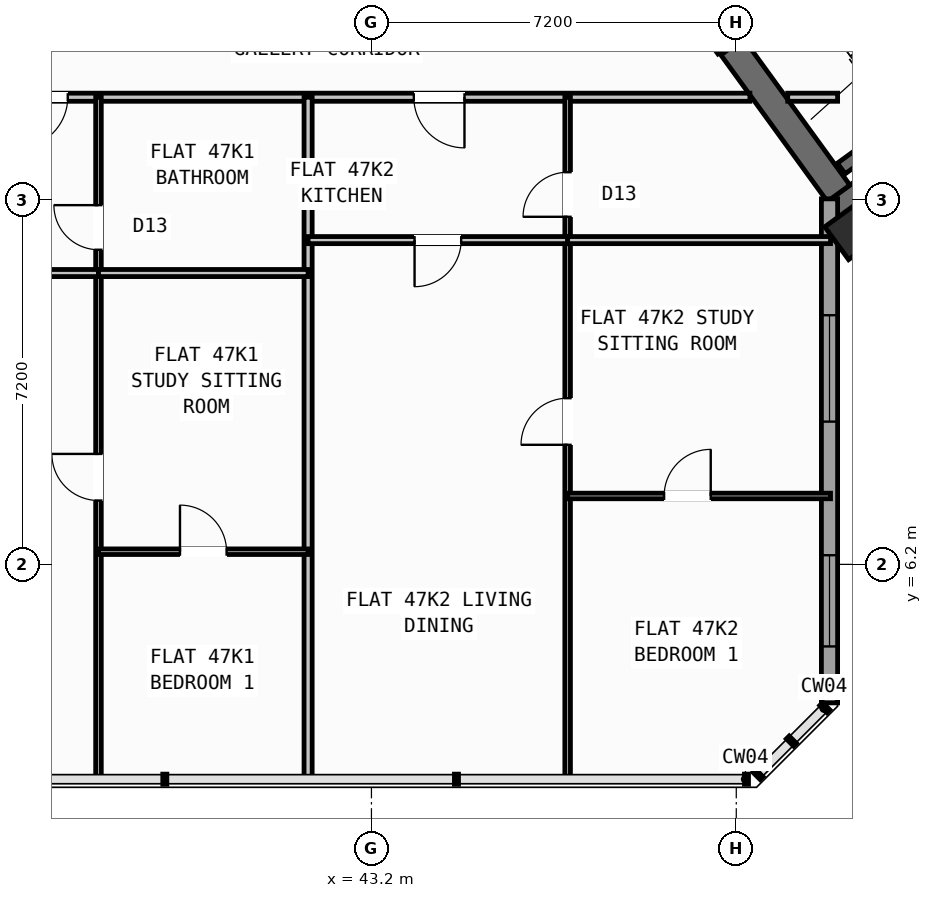
"""IFC4 building model, lengths in metres.
Left out: names, types, materials, properties, quantities, classifications, styles, units other than length and angle.
Written with IfcOpenShell. Run it as: python <this file> out.ifc"""

import sys

from ifc_helpers import new_model, si_unit, direction, frame, frame_2d, origin, origin_2d, place, context, subcontext, project, spatial, rectangle, hollow_rectangle, extrude, source, transform, mapped, element, fill, save


model = new_model("IFC4")
c1 = context("Model", 3, precision=1e-05, world=origin(), true_north=direction((0.0, 1.0)))
c2 = subcontext(c1, "Body", "Model", "MODEL_VIEW")
j1 = project(units=[si_unit("LENGTHUNIT", "METRE"), si_unit("PLANEANGLEUNIT", "RADIAN")], contexts=[c1])
p1 = place(None, origin())
s1 = spatial("IfcSite", under=j1, at=p1, CompositionType="ELEMENT")
p2 = place(p1, origin())
s2 = spatial("IfcBuilding", under=s1, at=p2, CompositionType="ELEMENT")
p3 = place(p2, frame((0.0, 0.0, 187.8)))
s3 = spatial("IfcBuildingStorey", under=s2, at=p3, CompositionType="ELEMENT", Elevation=187.8)
p4 = place(p3, frame((36.683, 18.304, 0.0), z_axis=(0.0, 0.0, 1.0), x_axis=(-0.529896466841, -0.848062341122, 0.0)))
e1 = element("IfcWall", 1, at=p4, inside=s3, PredefinedType="SHEAR", context=c2, shape_type="SweptSolid", body=[
    extrude(rectangle(XDim=6.425, YDim=0.55, at=frame_2d((3.212, 0.0))), origin(), (0.0, 0.0, 1.0), 3.35),
])
p5 = place(p3, frame((52.359, 13.14, 0.0), z_axis=(0.0, 0.0, 1.0), x_axis=(0.809014896919, 0.587788139183, 0.0)))
e2 = element("IfcWall", 2, at=p5, inside=s3, PredefinedType="SHEAR", context=c2, shape_type="SweptSolid", body=[
    extrude(rectangle(XDim=12.34, YDim=0.55, at=frame_2d((6.17, 0.0))), origin(), (0.0, 0.0, 1.0), 3.35),
])
p6 = place(p3, frame((52.42, 13.524, 0.0), z_axis=(0.0, 0.0, 1.0), x_axis=(-0.587802113096, 0.809004744015, 0.0)))
e3 = element("IfcWall", 3, at=p6, inside=s3, PredefinedType="SHEAR", context=c2, shape_type="SweptSolid", body=[
    extrude(rectangle(XDim=3.575, YDim=0.55, at=frame_2d((1.788, 0.0))), origin(), (0.0, 0.0, 1.0), 3.35),
])
m1 = source(origin(), c2, "Body", "SweptSolid", [
    extrude(hollow_rectangle(XDim=0.8, YDim=0.8, WallThickness=0.032, at=origin_2d()), origin(), (0.0, 0.0, 1.0), 3.6),
])
p7 = place(p3, frame((52.705, 12.773, 0.0), z_axis=(0.0, 0.0, 1.0), x_axis=(0.809016994375, 0.587785252292, 0.0)))
e4 = element("IfcColumn", 4, at=p7, inside=s3, PredefinedType="COLUMN", context=c2, shape_type="MappedRepresentation", body=[
    mapped(m1, transform((0.0, 0.0, 0.0), scale=1.0)),
])
p8 = place(p3, frame((52.24, 13.414, 0.0), z_axis=(0.0, 0.0, 1.0), x_axis=(0.0, -1.0, 0.0)))
e5 = element("IfcWall", 5, at=p8, inside=s3, PredefinedType="STANDARD", context=c2, shape_type="SweptSolid", body=[
    extrude(rectangle(XDim=9.948, YDim=0.32, at=frame_2d((4.974, 0.0))), origin(), (0.0, 0.0, 1.0), 3.35),
])
p9 = place(p8, frame((2.296, 0.0, 0.8)))
e6 = element("IfcOpeningElement", 6, at=p9, cuts=e5, PredefinedType="OPENING", context=c2, shape_type="SweptSolid", body=[
    extrude(rectangle(XDim=2.1, YDim=1.55, at=frame_2d((1.05, 0.775))), frame((0.0, 0.17, 0.0), z_axis=(0.0, -1.0, 0.0), x_axis=(1.0, 0.0, 0.0)), (0.0, 0.0, 1.0), 0.34),
])
p10 = place(p8, frame((7.033, 0.0, 0.85)))
e7 = element("IfcOpeningElement", 7, at=p10, cuts=e5, PredefinedType="OPENING", context=c2, shape_type="SweptSolid", body=[
    extrude(rectangle(XDim=1.8, YDim=1.5, at=frame_2d((0.9, 0.75))), frame((0.0, 0.17, 0.0), z_axis=(0.0, -1.0, 0.0), x_axis=(1.0, 0.0, 0.0)), (0.0, 0.0, 1.0), 0.34),
])
p11 = place(p3, frame((52.472, 14.013, 0.0), z_axis=(0.0, 0.0, 1.0), x_axis=(0.809028366311, 0.587769599847, 0.0)))
e8 = element("IfcWall", 8, at=p11, inside=s3, PredefinedType="SHEAR", context=c2, shape_type="SweptSolid", body=[
    extrude(rectangle(XDim=7.33, YDim=0.26, at=frame_2d((3.665, 0.0))), origin(), (0.0, 0.0, 1.0), 3.35),
])
p12 = place(p3, frame((35.237, 15.42, 0.0), z_axis=(0.0, 0.0, 1.0), x_axis=(1.0, 0.0, 0.0)))
e9 = element("IfcWall", 9, at=p12, inside=s3, PredefinedType="PARTITIONING", context=c2, shape_type="SweptSolid", body=[
    extrude(rectangle(XDim=15.432, YDim=0.16, at=frame_2d((7.716, 0.0))), origin(), (0.0, 0.0, 1.0), 3.34),
])
p13 = place(p12, frame((0.969, 0.0, 0.0)))
e10 = element("IfcOpeningElement", 10, at=p13, cuts=e9, PredefinedType="OPENING", context=c2, shape_type="SweptSolid", body=[
    extrude(rectangle(XDim=1.0, YDim=2.1, at=frame_2d((0.5, 1.05))), frame((0.0, 0.09, 0.0), z_axis=(0.0, -1.0, 0.0), x_axis=(1.0, 0.0, 0.0)), (0.0, 0.0, 1.0), 0.18),
])
p14 = place(p12, frame((8.799, 0.0, 0.0)))
e11 = element("IfcOpeningElement", 11, at=p14, cuts=e9, PredefinedType="OPENING", context=c2, shape_type="SweptSolid", body=[
    extrude(rectangle(XDim=1.0, YDim=2.1, at=frame_2d((0.5, 1.05))), frame((0.0, 0.09, 0.0), z_axis=(0.0, -1.0, 0.0), x_axis=(1.0, 0.0, 0.0)), (0.0, 0.0, 1.0), 0.18),
])
p15 = place(p3, frame((51.416, 15.42, 0.0), z_axis=(0.0, 0.0, 1.0), x_axis=(1.0, 0.0, 0.0)))
e12 = element("IfcWall", 12, at=p15, inside=s3, PredefinedType="PARTITIONING", context=c2, shape_type="SweptSolid", body=[
    extrude(rectangle(XDim=0.984, YDim=0.16, at=frame_2d((0.492, 0.0))), origin(), (0.0, 0.0, 1.0), 3.34),
])
p16 = place(p3, frame((50.119, 16.333, 0.0), z_axis=(0.0, 0.0, 1.0), x_axis=(-0.587749856981, 0.809042709391, 0.0)))
e13 = element("IfcWall", 13, at=p16, inside=s3, PredefinedType="STANDARD", context=c2, shape_type="SweptSolid", body=[
    extrude(rectangle(XDim=2.96, YDim=0.2, at=frame_2d((1.48, 0.0))), origin(), (0.0, 0.0, 1.0), 3.34),
])
p17 = place(p16, frame((0.53, 0.0, 0.0)))
e14 = element("IfcOpeningElement", 14, at=p17, cuts=e13, PredefinedType="OPENING", context=c2, shape_type="SweptSolid", body=[
    extrude(rectangle(XDim=1.5, YDim=2.15, at=frame_2d((0.75, 1.075))), frame((0.0, 0.11, 0.0), z_axis=(0.0, -1.0, 0.0), x_axis=(1.0, 0.0, 0.0)), (0.0, 0.0, 1.0), 0.22),
])
p18 = place(p3, frame((41.95, 1.96, 0.0), z_axis=(0.0, 0.0, 1.0), x_axis=(0.0, 1.0, 0.0)))
e15 = element("IfcWall", 15, at=p18, inside=s3, PredefinedType="PARTITIONING", context=c2, shape_type="SweptSolid", body=[
    extrude(rectangle(XDim=13.46, YDim=0.16, at=frame_2d((6.73, 0.0))), origin(), (0.0, 0.0, 1.0), 3.34),
])
p19 = place(p3, frame((37.813, 1.96, 0.0), z_axis=(0.0, 0.0, 1.0), x_axis=(0.0, 1.0, 0.0)))
e16 = element("IfcWall", 16, at=p19, inside=s3, PredefinedType="PARTITIONING", context=c2, shape_type="SweptSolid", body=[
    extrude(rectangle(XDim=13.46, YDim=0.11, at=frame_2d((6.73, 0.0))), origin(), (0.0, 0.0, 1.0), 3.34),
])
p20 = place(p19, frame((5.5, 0.0, 0.0)))
e17 = element("IfcOpeningElement", 17, at=p20, cuts=e16, PredefinedType="OPENING", context=c2, shape_type="SweptSolid", body=[
    extrude(rectangle(XDim=0.92, YDim=2.08, at=frame_2d((0.46, 1.04))), frame((0.0, 0.065, 0.0), z_axis=(0.0, -1.0, 0.0), x_axis=(1.0, 0.0, 0.0)), (0.0, 0.0, 1.0), 0.13),
])
p21 = place(p19, frame((10.45, 0.0, 0.0)))
e18 = element("IfcOpeningElement", 18, at=p21, cuts=e16, PredefinedType="OPENING", context=c2, shape_type="SweptSolid", body=[
    extrude(rectangle(XDim=0.88, YDim=2.08, at=frame_2d((0.44, 1.04))), frame((0.0, 0.065, 0.0), z_axis=(0.0, -1.0, 0.0), x_axis=(1.0, 0.0, 0.0)), (0.0, 0.0, 1.0), 0.13),
])
p22 = place(p3, frame((33.447, 11.95, 0.0), z_axis=(0.0, 0.0, 1.0), x_axis=(1.0, 0.0, 0.0)))
e19 = element("IfcWall", 19, at=p22, inside=s3, PredefinedType="PLUMBINGWALL", context=c2, shape_type="SweptSolid", body=[
    extrude(rectangle(XDim=4.366, YDim=0.14, at=frame_2d((2.183, 0.0))), origin(), (0.0, 0.0, 1.0), 2.525),
])
p23 = place(p22, frame((1.05, 0.0, 0.0)))
e20 = element("IfcOpeningElement", 20, at=p23, cuts=e19, PredefinedType="OPENING", context=c2, shape_type="SweptSolid", body=[
    extrude(rectangle(XDim=0.92, YDim=2.08, at=frame_2d((0.46, 1.04))), frame((0.0, 0.08, 0.0), z_axis=(0.0, -1.0, 0.0), x_axis=(1.0, 0.0, 0.0)), (0.0, 0.0, 1.0), 0.16),
])
p24 = place(p3, frame((37.813, 11.95, 0.0), z_axis=(0.0, 0.0, 1.0), x_axis=(1.0, 0.0, 0.0)))
e21 = element("IfcWall", 21, at=p24, inside=s3, PredefinedType="PLUMBINGWALL", context=c2, shape_type="SweptSolid", body=[
    extrude(rectangle(XDim=4.137, YDim=0.14, at=frame_2d((2.068, 0.0))), origin(), (0.0, 0.0, 1.0), 2.525),
])
p25 = place(p3, frame((37.813, 6.45, 0.0), z_axis=(0.0, 0.0, 1.0), x_axis=(1.0, 0.0, 0.0)))
e22 = element("IfcWall", 22, at=p25, inside=s3, PredefinedType="PARTITIONING", context=c2, shape_type="SweptSolid", body=[
    extrude(rectangle(XDim=4.137, YDim=0.11, at=frame_2d((2.068, 0.0))), origin(), (0.0, 0.0, 1.0), 3.34),
])
p26 = place(p25, frame((1.608, 0.0, 0.0)))
e23 = element("IfcOpeningElement", 23, at=p26, cuts=e22, PredefinedType="OPENING", context=c2, shape_type="SweptSolid", body=[
    extrude(rectangle(XDim=0.92, YDim=2.08, at=frame_2d((0.46, 1.04))), frame((0.0, 0.065, 0.0), z_axis=(0.0, -1.0, 0.0), x_axis=(1.0, 0.0, 0.0)), (0.0, 0.0, 1.0), 0.13),
])
p27 = place(p3, frame((47.072, 1.96, 0.0), z_axis=(0.0, 0.0, 1.0), x_axis=(0.0, 1.0, 0.0)))
e24 = element("IfcWall", 24, at=p27, inside=s3, PredefinedType="PARTITIONING", context=c2, shape_type="SweptSolid", body=[
    extrude(rectangle(XDim=13.46, YDim=0.11, at=frame_2d((6.73, 0.0))), origin(), (0.0, 0.0, 1.0), 3.34),
])
p28 = place(p27, frame((6.6, 0.0, 0.0)))
e25 = element("IfcOpeningElement", 25, at=p28, cuts=e24, PredefinedType="OPENING", context=c2, shape_type="SweptSolid", body=[
    extrude(rectangle(XDim=0.92, YDim=2.08, at=frame_2d((0.46, 1.04))), frame((0.0, 0.065, 0.0), z_axis=(0.0, -1.0, 0.0), x_axis=(1.0, 0.0, 0.0)), (0.0, 0.0, 1.0), 0.13),
])
p29 = place(p27, frame((11.1, 0.0, 0.0)))
e26 = element("IfcOpeningElement", 26, at=p29, cuts=e24, PredefinedType="OPENING", context=c2, shape_type="SweptSolid", body=[
    extrude(rectangle(XDim=0.88, YDim=2.08, at=frame_2d((0.44, 1.04))), frame((0.0, 0.065, 0.0), z_axis=(0.0, -1.0, 0.0), x_axis=(1.0, 0.0, 0.0)), (0.0, 0.0, 1.0), 0.13),
])
p30 = place(p3, frame((41.95, 12.6, 0.0), z_axis=(0.0, 0.0, 1.0), x_axis=(1.0, 0.0, 0.0)))
e27 = element("IfcWall", 27, at=p30, inside=s3, PredefinedType="PLUMBINGWALL", context=c2, shape_type="SweptSolid", body=[
    extrude(rectangle(XDim=5.122, YDim=0.14, at=frame_2d((2.561, 0.0))), origin(), (0.0, 0.0, 1.0), 2.525),
])
p31 = place(p30, frame((2.101, 0.0, 0.0)))
e28 = element("IfcOpeningElement", 28, at=p31, cuts=e27, PredefinedType="OPENING", context=c2, shape_type="SweptSolid", body=[
    extrude(rectangle(XDim=0.92, YDim=2.08, at=frame_2d((0.46, 1.04))), frame((0.0, 0.08, 0.0), z_axis=(0.0, -1.0, 0.0), x_axis=(1.0, 0.0, 0.0)), (0.0, 0.0, 1.0), 0.16),
])
p32 = place(p3, frame((47.072, 12.6, 0.0), z_axis=(0.0, 0.0, 1.0), x_axis=(1.0, 0.0, 0.0)))
e29 = element("IfcWall", 29, at=p32, inside=s3, PredefinedType="PLUMBINGWALL", context=c2, shape_type="SweptSolid", body=[
    extrude(rectangle(XDim=5.188, YDim=0.14, at=frame_2d((2.594, 0.0))), origin(), (0.0, 0.0, 1.0), 2.525),
])
p33 = place(p3, frame((47.072, 7.55, 0.0), z_axis=(0.0, 0.0, 1.0), x_axis=(1.0, 0.0, 0.0)))
e30 = element("IfcWall", 30, at=p33, inside=s3, PredefinedType="PARTITIONING", context=c2, shape_type="SweptSolid", body=[
    extrude(rectangle(XDim=5.188, YDim=0.11, at=frame_2d((2.594, 0.0))), origin(), (0.0, 0.0, 1.0), 3.34),
])
p34 = place(p33, frame((1.904, 0.0, 0.0)))
e31 = element("IfcOpeningElement", 31, at=p34, cuts=e30, PredefinedType="OPENING", context=c2, shape_type="SweptSolid", body=[
    extrude(rectangle(XDim=0.92, YDim=2.08, at=frame_2d((0.46, 1.04))), frame((0.0, 0.065, 0.0), z_axis=(0.0, -1.0, 0.0), x_axis=(1.0, 0.0, 0.0)), (0.0, 0.0, 1.0), 0.13),
])
m2 = source(origin(), c2, "Body", "SweptSolid", [
    extrude(rectangle(XDim=2.1, YDim=1.55, at=frame_2d((1.05, 0.775))), frame((0.0, 0.03, 0.0), z_axis=(0.0, -1.0, 0.0), x_axis=(1.0, 0.0, 0.0)), (0.0, 0.0, 1.0), 0.06),
])
p35 = place(p9, origin())
e32 = element("IfcWindow", 32, at=p35, inside=s3, PartitioningType="SINGLE_PANEL", PredefinedType="WINDOW", context=c2, shape_type="MappedRepresentation", body=[
    mapped(m2, transform((0.0, 0.0, 0.0), scale=1.0)),
])
fill(e6, e32)
m3 = source(origin(), c2, "Body", "SweptSolid", [
    extrude(rectangle(XDim=1.8, YDim=1.5, at=frame_2d((0.9, 0.75))), frame((0.0, 0.03, 0.0), z_axis=(0.0, -1.0, 0.0), x_axis=(1.0, 0.0, 0.0)), (0.0, 0.0, 1.0), 0.06),
])
p36 = place(p10, origin())
e33 = element("IfcWindow", 33, at=p36, inside=s3, PartitioningType="SINGLE_PANEL", PredefinedType="WINDOW", context=c2, shape_type="MappedRepresentation", body=[
    mapped(m3, transform((0.0, 0.0, 0.0), scale=1.0)),
])
fill(e7, e33)
m4 = source(origin(), c2, "Body", "SweptSolid", [
    extrude(rectangle(XDim=0.92, YDim=2.08, at=frame_2d((0.46, 1.04))), frame((0.0, 0.025, 0.0), z_axis=(0.0, -1.0, 0.0), x_axis=(1.0, 0.0, 0.0)), (0.0, 0.0, 1.0), 0.05),
])
p37 = place(p20, origin())
e34 = element("IfcDoor", 34, at=p37, inside=s3, OperationType="SINGLE_SWING_RIGHT", PredefinedType="DOOR", context=c2, shape_type="MappedRepresentation", body=[
    mapped(m4, transform((0.0, 0.0, 0.0), scale=1.0)),
])
fill(e17, e34)
p38 = place(p26, origin())
e35 = element("IfcDoor", 35, at=p38, inside=s3, OperationType="SINGLE_SWING_LEFT", PredefinedType="DOOR", context=c2, shape_type="MappedRepresentation", body=[
    mapped(m4, transform((0.0, 0.0, 0.0), scale=1.0)),
])
fill(e23, e35)
m5 = source(origin(), c2, "Body", "SweptSolid", [
    extrude(rectangle(XDim=1.0, YDim=2.1, at=frame_2d((0.5, 1.05))), frame((0.0, 0.025, 0.0), z_axis=(0.0, -1.0, 0.0), x_axis=(1.0, 0.0, 0.0)), (0.0, 0.0, 1.0), 0.05),
])
p39 = place(p13, frame((1.0, 0.0, 0.0), z_axis=(0.0, 0.0, 1.0), x_axis=(-1.0, 0.0, 0.0)))
e36 = element("IfcDoor", 36, at=p39, inside=s3, OperationType="SINGLE_SWING_RIGHT", PredefinedType="DOOR", context=c2, shape_type="MappedRepresentation", body=[
    mapped(m5, transform((0.0, 0.0, 0.0), scale=1.0)),
])
fill(e10, e36)
m6 = source(origin(), c2, "Body", "SweptSolid", [
    extrude(rectangle(XDim=0.88, YDim=2.08, at=frame_2d((0.44, 1.04))), frame((0.0, 0.025, 0.0), z_axis=(0.0, -1.0, 0.0), x_axis=(1.0, 0.0, 0.0)), (0.0, 0.0, 1.0), 0.05),
])
p40 = place(p21, origin())
e37 = element("IfcDoor", 37, at=p40, inside=s3, OperationType="SINGLE_SWING_RIGHT", PredefinedType="DOOR", context=c2, shape_type="MappedRepresentation", body=[
    mapped(m6, transform((0.0, 0.0, 0.0), scale=1.0)),
])
fill(e18, e37)
p41 = place(p28, origin())
e38 = element("IfcDoor", 38, at=p41, inside=s3, OperationType="SINGLE_SWING_LEFT", PredefinedType="DOOR", context=c2, shape_type="MappedRepresentation", body=[
    mapped(m4, transform((0.0, 0.0, 0.0), scale=1.0)),
])
fill(e25, e38)
p42 = place(p34, origin())
e39 = element("IfcDoor", 39, at=p42, inside=s3, OperationType="SINGLE_SWING_RIGHT", PredefinedType="DOOR", context=c2, shape_type="MappedRepresentation", body=[
    mapped(m4, transform((0.0, 0.0, 0.0), scale=1.0)),
])
fill(e31, e39)
p43 = place(p14, frame((1.0, 0.0, 0.0), z_axis=(0.0, 0.0, 1.0), x_axis=(-1.0, 0.0, 0.0)))
e40 = element("IfcDoor", 40, at=p43, inside=s3, OperationType="SINGLE_SWING_LEFT", PredefinedType="DOOR", context=c2, shape_type="MappedRepresentation", body=[
    mapped(m5, transform((0.0, 0.0, 0.0), scale=1.0)),
])
fill(e11, e40)
p44 = place(p31, frame((0.92, 0.0, 0.0), z_axis=(0.0, 0.0, 1.0), x_axis=(-1.0, 0.0, 0.0)))
e41 = element("IfcDoor", 41, at=p44, inside=s3, OperationType="SINGLE_SWING_RIGHT", PredefinedType="DOOR", context=c2, shape_type="MappedRepresentation", body=[
    mapped(m4, transform((0.0, 0.0, 0.0), scale=1.0)),
])
fill(e28, e41)
p45 = place(p29, origin())
e42 = element("IfcDoor", 42, at=p45, inside=s3, OperationType="SINGLE_SWING_LEFT", PredefinedType="DOOR", context=c2, shape_type="MappedRepresentation", body=[
    mapped(m6, transform((0.0, 0.0, 0.0), scale=1.0)),
])
fill(e26, e42)
save(model, sys.argv[1])
